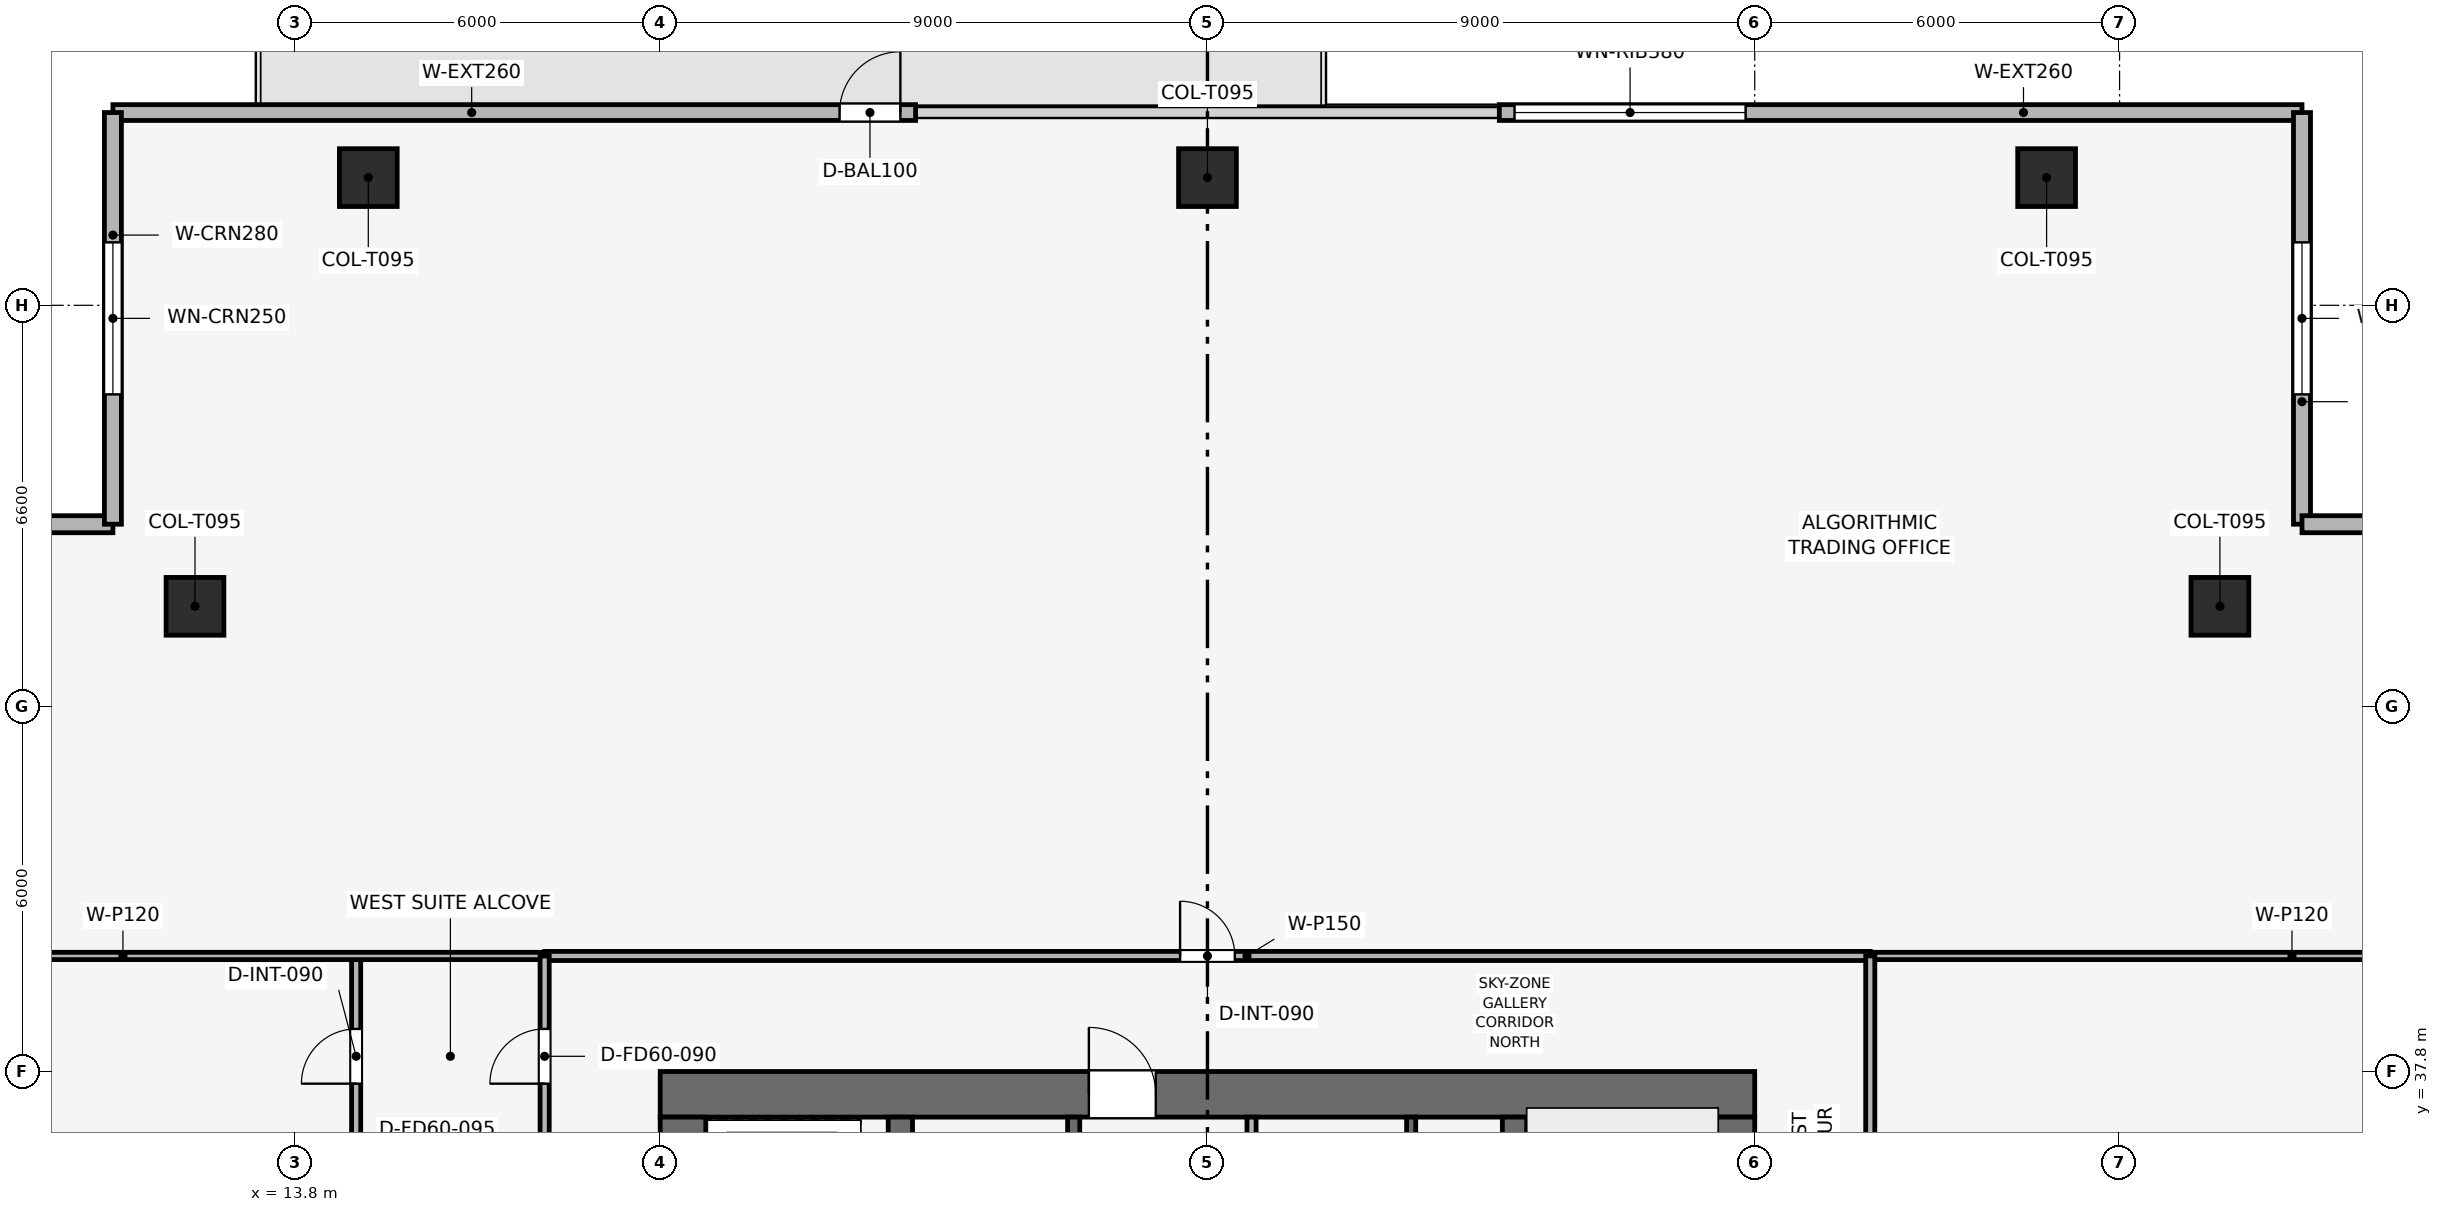
"""IFC4 building model, lengths in metres.
Left out: names, types, materials, properties, quantities, classifications, styles, units other than length and angle.
Written with IfcOpenShell. Run it as: python <this file> out.ifc"""

import sys

from ifc_helpers import new_model, si_unit, direction, frame, frame_2d, origin, origin_2d, place, context, subcontext, project, spatial, rectangle, extrude, element, fill, save


model = new_model("IFC4")
c1 = context("Model", 3, precision=1e-05, world=origin(), true_north=direction((0.0, 1.0)))
c2 = subcontext(c1, "Body", "Model", "MODEL_VIEW")
j1 = project(units=[si_unit("LENGTHUNIT", "METRE"), si_unit("PLANEANGLEUNIT", "RADIAN")], contexts=[c1])
p1 = place(None, origin())
s1 = spatial("IfcSite", under=j1, at=p1, CompositionType="ELEMENT")
p2 = place(p1, origin())
s2 = spatial("IfcBuilding", under=s1, at=p2, CompositionType="ELEMENT")
p3 = place(p2, frame((0.0, 0.0, 261.6)))
s3 = spatial("IfcBuildingStorey", under=s2, at=p3, CompositionType="ELEMENT", Elevation=261.6)
p4 = place(p3, frame((19.8, 37.425, 0.0), z_axis=(0.0, 0.0, 1.0), x_axis=(1.0, 0.0, 0.0)))
e1 = element("IfcWall", 1, at=p4, inside=s3, PredefinedType="SHEAR", context=c2, shape_type="SweptSolid", body=[
    extrude(rectangle(XDim=18.0, YDim=0.75, at=frame_2d((9.0, 0.0))), origin(), (0.0, 0.0, 1.0), 3.75),
])
p5 = place(p4, frame((7.05, 0.0, 0.0)))
e2 = element("IfcOpeningElement", 2, at=p5, cuts=e1, PredefinedType="OPENING", context=c2, shape_type="SweptSolid", body=[
    extrude(rectangle(XDim=1.1, YDim=2.15, at=frame_2d((0.55, 1.075))), frame((0.0, 0.385, 0.0), z_axis=(0.0, -1.0, 0.0), x_axis=(1.0, 0.0, 0.0)), (0.0, 0.0, 1.0), 0.77),
])
p6 = place(p3, frame((20.175, 20.55, 0.0), z_axis=(0.0, 0.0, 1.0), x_axis=(0.0, 1.0, 0.0)))
e3 = element("IfcWall", 3, at=p6, inside=s3, PredefinedType="SHEAR", context=c2, shape_type="SweptSolid", body=[
    extrude(rectangle(XDim=16.5, YDim=0.75, at=frame_2d((8.25, 0.0))), origin(), (0.0, 0.0, 1.0), 3.75),
])
p7 = place(p6, frame((10.25, 0.0, 0.0)))
e4 = element("IfcOpeningElement", 4, at=p7, cuts=e3, PredefinedType="OPENING", context=c2, shape_type="SweptSolid", body=[
    extrude(rectangle(XDim=1.1, YDim=2.15, at=frame_2d((0.55, 1.075))), frame((0.0, 0.385, 0.0), z_axis=(0.0, -1.0, 0.0), x_axis=(1.0, 0.0, 0.0)), (0.0, 0.0, 1.0), 0.77),
])
p8 = place(p3, frame((37.425, 20.55, 0.0), z_axis=(0.0, 0.0, 1.0), x_axis=(0.0, 1.0, 0.0)))
e5 = element("IfcWall", 5, at=p8, inside=s3, PredefinedType="SHEAR", context=c2, shape_type="SweptSolid", body=[
    extrude(rectangle(XDim=16.5, YDim=0.75, at=frame_2d((8.25, 0.0))), origin(), (0.0, 0.0, 1.0), 3.75),
])
p9 = place(p8, frame((4.75, 0.0, 0.0)))
e6 = element("IfcOpeningElement", 6, at=p9, cuts=e5, PredefinedType="OPENING", context=c2, shape_type="SweptSolid", body=[
    extrude(rectangle(XDim=1.1, YDim=2.15, at=frame_2d((0.55, 1.075))), frame((0.0, 0.385, 0.0), z_axis=(0.0, -1.0, 0.0), x_axis=(1.0, 0.0, 0.0)), (0.0, 0.0, 1.0), 0.77),
])
for number, where, z_axis, x_axis in (
    (7, (23.75, 20.55, 0.0), (0.0, 0.0, 1.0), (0.0, 1.0, 0.0)),
    (8, (33.85, 20.55, 0.0), (0.0, 0.0, 1.0), (0.0, 1.0, 0.0)),
):
    element("IfcWall", number, at=place(p3, frame(where, z_axis=z_axis, x_axis=x_axis)), inside=s3, PredefinedType="SHEAR", context=c2, shape_type="SweptSolid", body=[
        extrude(rectangle(XDim=16.5, YDim=0.4, at=frame_2d((8.25, 0.0))), origin(), (0.0, 0.0, 1.0), 3.75),
    ])
for number, where, z_axis, x_axis in (
    (9, (42.6, 52.5, 0.003), (0.0, 0.0, 1.0), (1.0, 0.0, 0.0)),
    (10, (28.8, 52.5, 0.003), (0.0, 0.0, 1.0), (1.0, 0.0, 0.0)),
    (11, (15.0, 52.5, 0.003), (0.0, 0.0, 1.0), (1.0, 0.0, 0.0)),
    (12, (45.45, 45.45, 0.003), (0.0, 0.0, 1.0), (1.0, 0.0, 0.0)),
    (13, (12.15, 45.45, 0.003), (0.0, 0.0, 1.0), (1.0, 0.0, 0.0)),
):
    element("IfcColumn", number, at=place(p3, frame(where, z_axis=z_axis, x_axis=x_axis)), inside=s3, PredefinedType="COLUMN", context=c2, shape_type="SweptSolid", body=[
        extrude(rectangle(XDim=0.95, YDim=0.95, at=origin_2d()), origin(), (0.0, 0.0, 1.0), 3.494),
    ])
p10 = place(p3, frame((10.8, 53.57, 0.0), z_axis=(0.0, 0.0, 1.0), x_axis=(1.0, 0.0, 0.0)))
e14 = element("IfcWall", 14, at=p10, inside=s3, PredefinedType="SOLIDWALL", context=c2, shape_type="SweptSolid", body=[
    extrude(rectangle(XDim=13.2, YDim=0.26, at=frame_2d((6.6, 0.0))), origin(), (0.0, 0.0, 1.0), 3.5),
])
p11 = place(p10, frame((11.95, 0.0, 0.0)))
e15 = element("IfcOpeningElement", 15, at=p11, cuts=e14, PredefinedType="OPENING", context=c2, shape_type="SweptSolid", body=[
    extrude(rectangle(XDim=1.0, YDim=2.2, at=frame_2d((0.5, 1.1))), frame((0.0, 0.14, 0.0), z_axis=(0.0, -1.0, 0.0), x_axis=(1.0, 0.0, 0.0)), (0.0, 0.0, 1.0), 0.28),
])
p12 = place(p3, frame((33.6, 53.57, 0.0), z_axis=(0.0, 0.0, 1.0), x_axis=(1.0, 0.0, 0.0)))
e16 = element("IfcWall", 16, at=p12, inside=s3, PredefinedType="SOLIDWALL", context=c2, shape_type="SweptSolid", body=[
    extrude(rectangle(XDim=13.2, YDim=0.26, at=frame_2d((6.6, 0.0))), origin(), (0.0, 0.0, 1.0), 3.5),
])
p13 = place(p12, frame((0.25, 0.0, 0.9)))
e17 = element("IfcOpeningElement", 17, at=p13, cuts=e16, PredefinedType="OPENING", context=c2, shape_type="SweptSolid", body=[
    extrude(rectangle(XDim=3.8, YDim=1.9, at=frame_2d((1.9, 0.95))), frame((0.0, 0.14, 0.0), z_axis=(0.0, -1.0, 0.0), x_axis=(1.0, 0.0, 0.0)), (0.0, 0.0, 1.0), 0.28),
])
p14 = place(p3, frame((4.03, 46.8, 0.0), z_axis=(0.0, 0.0, 1.0), x_axis=(1.0, 0.0, 0.0)))
e18 = element("IfcWall", 18, at=p14, inside=s3, PredefinedType="SOLIDWALL", context=c2, shape_type="SweptSolid", body=[
    extrude(rectangle(XDim=6.77, YDim=0.28, at=frame_2d((3.385, 0.0))), origin(), (0.0, 0.0, 1.0), 3.5),
])
p15 = place(p14, frame((2.135, 0.0, 0.9)))
e19 = element("IfcOpeningElement", 19, at=p15, cuts=e18, PredefinedType="OPENING", context=c2, shape_type="SweptSolid", body=[
    extrude(rectangle(XDim=2.5, YDim=1.9, at=frame_2d((1.25, 0.95))), frame((0.0, 0.15, 0.0), z_axis=(0.0, -1.0, 0.0), x_axis=(1.0, 0.0, 0.0)), (0.0, 0.0, 1.0), 0.3),
])
p16 = place(p3, frame((10.8, 46.8, 0.0), z_axis=(0.0, 0.0, 1.0), x_axis=(0.0, 1.0, 0.0)))
e20 = element("IfcWall", 20, at=p16, inside=s3, PredefinedType="SOLIDWALL", context=c2, shape_type="SweptSolid", body=[
    extrude(rectangle(XDim=6.77, YDim=0.28, at=frame_2d((3.385, 0.0))), origin(), (0.0, 0.0, 1.0), 3.5),
])
p17 = place(p16, frame((2.135, 0.0, 0.9)))
e21 = element("IfcOpeningElement", 21, at=p17, cuts=e20, PredefinedType="OPENING", context=c2, shape_type="SweptSolid", body=[
    extrude(rectangle(XDim=2.5, YDim=1.9, at=frame_2d((1.25, 0.95))), frame((0.0, 0.15, 0.0), z_axis=(0.0, -1.0, 0.0), x_axis=(1.0, 0.0, 0.0)), (0.0, 0.0, 1.0), 0.3),
])
p18 = place(p3, frame((46.8, 53.57, 0.0), z_axis=(0.0, 0.0, 1.0), x_axis=(0.0, -1.0, 0.0)))
e22 = element("IfcWall", 22, at=p18, inside=s3, PredefinedType="SOLIDWALL", context=c2, shape_type="SweptSolid", body=[
    extrude(rectangle(XDim=6.77, YDim=0.28, at=frame_2d((3.385, 0.0))), origin(), (0.0, 0.0, 1.0), 3.5),
])
p19 = place(p18, frame((2.135, 0.0, 0.9)))
e23 = element("IfcOpeningElement", 23, at=p19, cuts=e22, PredefinedType="OPENING", context=c2, shape_type="SweptSolid", body=[
    extrude(rectangle(XDim=2.5, YDim=1.9, at=frame_2d((1.25, 0.95))), frame((0.0, 0.15, 0.0), z_axis=(0.0, -1.0, 0.0), x_axis=(1.0, 0.0, 0.0)), (0.0, 0.0, 1.0), 0.3),
])
p20 = place(p3, frame((46.8, 46.8, 0.0), z_axis=(0.0, 0.0, 1.0), x_axis=(1.0, 0.0, 0.0)))
e24 = element("IfcWall", 24, at=p20, inside=s3, PredefinedType="SOLIDWALL", context=c2, shape_type="SweptSolid", body=[
    extrude(rectangle(XDim=6.77, YDim=0.28, at=frame_2d((3.385, 0.0))), origin(), (0.0, 0.0, 1.0), 3.5),
])
p21 = place(p20, frame((2.135, 0.0, 0.9)))
e25 = element("IfcOpeningElement", 25, at=p21, cuts=e24, PredefinedType="OPENING", context=c2, shape_type="SweptSolid", body=[
    extrude(rectangle(XDim=2.5, YDim=1.9, at=frame_2d((1.25, 0.95))), frame((0.0, 0.15, 0.0), z_axis=(0.0, -1.0, 0.0), x_axis=(1.0, 0.0, 0.0)), (0.0, 0.0, 1.0), 0.3),
])
p22 = place(p3, frame((32.15, 34.0, 0.0), z_axis=(0.0, 0.0, 1.0), x_axis=(0.0, 1.0, 0.0)))
e26 = element("IfcWall", 26, at=p22, inside=s3, PredefinedType="SHEAR", context=c2, shape_type="SweptSolid", body=[
    extrude(rectangle(XDim=3.05, YDim=0.15, at=frame_2d((1.525, 0.0))), origin(), (0.0, 0.0, 1.0), 3.5),
])
p23 = place(p3, frame((26.6, 34.0, 0.0), z_axis=(0.0, 0.0, 1.0), x_axis=(0.0, 1.0, 0.0)))
e27 = element("IfcWall", 27, at=p23, inside=s3, PredefinedType="SHEAR", context=c2, shape_type="SweptSolid", body=[
    extrude(rectangle(XDim=3.05, YDim=0.2, at=frame_2d((1.525, 0.0))), origin(), (0.0, 0.0, 1.0), 3.5),
])
p24 = place(p23, frame((0.75, 0.0, 0.0)))
e28 = element("IfcOpeningElement", 28, at=p24, cuts=e27, PredefinedType="OPENING", context=c2, shape_type="SweptSolid", body=[
    extrude(rectangle(XDim=1.1, YDim=2.15, at=frame_2d((0.55, 1.075))), frame((0.0, 0.11, 0.0), z_axis=(0.0, -1.0, 0.0), x_axis=(1.0, 0.0, 0.0)), (0.0, 0.0, 1.0), 0.22),
])
p25 = place(p3, frame((29.525, 33.925, 0.0), z_axis=(0.0, 0.0, 1.0), x_axis=(0.0, 1.0, 0.0)))
e29 = element("IfcWall", 29, at=p25, inside=s3, PredefinedType="PARTITIONING", context=c2, shape_type="SweptSolid", body=[
    extrude(rectangle(XDim=3.125, YDim=0.15, at=frame_2d((1.562, 0.0))), origin(), (0.0, 0.0, 1.0), 3.5),
])
p26 = place(p25, frame((0.85, 0.0, 0.0)))
e30 = element("IfcOpeningElement", 30, at=p26, cuts=e29, PredefinedType="OPENING", context=c2, shape_type="SweptSolid", body=[
    extrude(rectangle(XDim=0.9, YDim=2.1, at=frame_2d((0.45, 1.05))), frame((0.0, 0.085, 0.0), z_axis=(0.0, -1.0, 0.0), x_axis=(1.0, 0.0, 0.0)), (0.0, 0.0, 1.0), 0.17),
])
p27 = place(p3, frame((14.8, 28.0, 0.0), z_axis=(0.0, 0.0, 1.0), x_axis=(0.0, 1.0, 0.0)))
e31 = element("IfcWall", 31, at=p27, inside=s3, PredefinedType="PARTITIONING", context=c2, shape_type="SweptSolid", body=[
    extrude(rectangle(XDim=11.7, YDim=0.15, at=frame_2d((5.85, 0.0))), origin(), (0.0, 0.0, 1.0), 3.085),
])
p28 = place(p27, frame((9.6, 0.0, 0.0)))
e32 = element("IfcOpeningElement", 32, at=p28, cuts=e31, PredefinedType="OPENING", context=c2, shape_type="SweptSolid", body=[
    extrude(rectangle(XDim=0.9, YDim=2.1, at=frame_2d((0.45, 1.05))), frame((0.0, 0.085, 0.0), z_axis=(0.0, -1.0, 0.0), x_axis=(1.0, 0.0, 0.0)), (0.0, 0.0, 1.0), 0.17),
])
p29 = place(p3, frame((4.03, 39.7, 0.0), z_axis=(0.0, 0.0, 1.0), x_axis=(1.0, 0.0, 0.0)))
e33 = element("IfcWall", 33, at=p29, inside=s3, PredefinedType="PARTITIONING", context=c2, shape_type="SweptSolid", body=[
    extrude(rectangle(XDim=13.87, YDim=0.12, at=frame_2d((6.935, 0.0))), origin(), (0.0, 0.0, 1.0), 3.085),
])
p30 = place(p3, frame((39.7, 39.7, 0.0), z_axis=(0.0, 0.0, 1.0), x_axis=(1.0, 0.0, 0.0)))
e34 = element("IfcWall", 34, at=p30, inside=s3, PredefinedType="PARTITIONING", context=c2, shape_type="SweptSolid", body=[
    extrude(rectangle(XDim=13.87, YDim=0.12, at=frame_2d((6.935, 0.0))), origin(), (0.0, 0.0, 1.0), 3.085),
])
p31 = place(p3, frame((17.9, 39.7, 0.0), z_axis=(0.0, 0.0, 1.0), x_axis=(1.0, 0.0, 0.0)))
e35 = element("IfcWall", 35, at=p31, inside=s3, PredefinedType="PARTITIONING", context=c2, shape_type="SweptSolid", body=[
    extrude(rectangle(XDim=21.8, YDim=0.15, at=frame_2d((10.9, 0.0))), origin(), (0.0, 0.0, 1.0), 3.085),
])
p32 = place(p31, frame((10.45, 0.0, 0.0)))
e36 = element("IfcOpeningElement", 36, at=p32, cuts=e35, PredefinedType="OPENING", context=c2, shape_type="SweptSolid", body=[
    extrude(rectangle(XDim=0.9, YDim=2.1, at=frame_2d((0.45, 1.05))), frame((0.0, 0.085, 0.0), z_axis=(0.0, -1.0, 0.0), x_axis=(1.0, 0.0, 0.0)), (0.0, 0.0, 1.0), 0.17),
])
p33 = place(p3, frame((17.9, 10.8, 0.0), z_axis=(0.0, 0.0, 1.0), x_axis=(0.0, 1.0, 0.0)))
e37 = element("IfcWall", 37, at=p33, inside=s3, PredefinedType="PARTITIONING", context=c2, shape_type="SweptSolid", body=[
    extrude(rectangle(XDim=28.9, YDim=0.15, at=frame_2d((14.45, 0.0))), origin(), (0.0, 0.0, 1.0), 3.085),
])
p34 = place(p33, frame((8.15, 0.0, 0.0)))
e38 = element("IfcOpeningElement", 38, at=p34, cuts=e37, PredefinedType="OPENING", context=c2, shape_type="SweptSolid", body=[
    extrude(rectangle(XDim=0.9, YDim=2.1, at=frame_2d((0.45, 1.05))), frame((0.0, 0.085, 0.0), z_axis=(0.0, -1.0, 0.0), x_axis=(1.0, 0.0, 0.0)), (0.0, 0.0, 1.0), 0.17),
])
p35 = place(p33, frame((18.15, 0.0, 0.0)))
e39 = element("IfcOpeningElement", 39, at=p35, cuts=e37, PredefinedType="OPENING", context=c2, shape_type="SweptSolid", body=[
    extrude(rectangle(XDim=0.9, YDim=2.1, at=frame_2d((0.45, 1.05))), frame((0.0, 0.085, 0.0), z_axis=(0.0, -1.0, 0.0), x_axis=(1.0, 0.0, 0.0)), (0.0, 0.0, 1.0), 0.17),
])
p36 = place(p33, frame((21.05, 0.0, 0.0)))
e40 = element("IfcOpeningElement", 40, at=p36, cuts=e37, PredefinedType="OPENING", context=c2, shape_type="SweptSolid", body=[
    extrude(rectangle(XDim=0.9, YDim=2.1, at=frame_2d((0.45, 1.05))), frame((0.0, 0.085, 0.0), z_axis=(0.0, -1.0, 0.0), x_axis=(1.0, 0.0, 0.0)), (0.0, 0.0, 1.0), 0.17),
])
p37 = place(p33, frame((23.8, 0.0, 0.0)))
e41 = element("IfcOpeningElement", 41, at=p37, cuts=e37, PredefinedType="OPENING", context=c2, shape_type="SweptSolid", body=[
    extrude(rectangle(XDim=0.95, YDim=2.1, at=frame_2d((0.475, 1.05))), frame((0.0, 0.085, 0.0), z_axis=(0.0, -1.0, 0.0), x_axis=(1.0, 0.0, 0.0)), (0.0, 0.0, 1.0), 0.17),
])
p38 = place(p33, frame((26.8, 0.0, 0.0)))
e42 = element("IfcOpeningElement", 42, at=p38, cuts=e37, PredefinedType="OPENING", context=c2, shape_type="SweptSolid", body=[
    extrude(rectangle(XDim=0.9, YDim=2.1, at=frame_2d((0.45, 1.05))), frame((0.0, 0.085, 0.0), z_axis=(0.0, -1.0, 0.0), x_axis=(1.0, 0.0, 0.0)), (0.0, 0.0, 1.0), 0.17),
])
p39 = place(p3, frame((39.7, 24.4, 0.0), z_axis=(0.0, 0.0, 1.0), x_axis=(0.0, 1.0, 0.0)))
e43 = element("IfcWall", 43, at=p39, inside=s3, PredefinedType="PARTITIONING", context=c2, shape_type="SweptSolid", body=[
    extrude(rectangle(XDim=15.3, YDim=0.15, at=frame_2d((7.65, 0.0))), origin(), (0.0, 0.0, 1.0), 3.085),
])
p40 = place(p39, frame((7.2, 0.0, 0.0)))
e44 = element("IfcOpeningElement", 44, at=p40, cuts=e43, PredefinedType="OPENING", context=c2, shape_type="SweptSolid", body=[
    extrude(rectangle(XDim=0.9, YDim=2.1, at=frame_2d((0.45, 1.05))), frame((0.0, 0.085, 0.0), z_axis=(0.0, -1.0, 0.0), x_axis=(1.0, 0.0, 0.0)), (0.0, 0.0, 1.0), 0.17),
])
p41 = place(p11, origin())
e45 = element("IfcDoor", 45, at=p41, inside=s3, OperationType="SINGLE_SWING_RIGHT", PredefinedType="DOOR", context=c2, shape_type="SweptSolid", body=[
    extrude(rectangle(XDim=1.0, YDim=2.2, at=frame_2d((0.5, 1.1))), frame((0.0, 0.025, 0.0), z_axis=(0.0, -1.0, 0.0), x_axis=(1.0, 0.0, 0.0)), (0.0, 0.0, 1.0), 0.05),
])
fill(e15, e45)
p42 = place(p13, origin())
e46 = element("IfcWindow", 46, at=p42, inside=s3, PartitioningType="SINGLE_PANEL", PredefinedType="WINDOW", context=c2, shape_type="SweptSolid", body=[
    extrude(rectangle(XDim=3.8, YDim=1.9, at=frame_2d((1.9, 0.95))), frame((0.0, 0.03, 0.0), z_axis=(0.0, -1.0, 0.0), x_axis=(1.0, 0.0, 0.0)), (0.0, 0.0, 1.0), 0.06),
])
fill(e17, e46)
p43 = place(p17, origin())
e47 = element("IfcWindow", 47, at=p43, inside=s3, PartitioningType="SINGLE_PANEL", PredefinedType="WINDOW", context=c2, shape_type="SweptSolid", body=[
    extrude(rectangle(XDim=2.5, YDim=1.9, at=frame_2d((1.25, 0.95))), frame((0.0, 0.03, 0.0), z_axis=(0.0, -1.0, 0.0), x_axis=(1.0, 0.0, 0.0)), (0.0, 0.0, 1.0), 0.06),
])
fill(e21, e47)
p44 = place(p19, origin())
e48 = element("IfcWindow", 48, at=p44, inside=s3, PartitioningType="SINGLE_PANEL", PredefinedType="WINDOW", context=c2, shape_type="SweptSolid", body=[
    extrude(rectangle(XDim=2.5, YDim=1.9, at=frame_2d((1.25, 0.95))), frame((0.0, 0.03, 0.0), z_axis=(0.0, -1.0, 0.0), x_axis=(1.0, 0.0, 0.0)), (0.0, 0.0, 1.0), 0.06),
])
fill(e23, e48)
p45 = place(p28, origin())
e49 = element("IfcDoor", 49, at=p45, inside=s3, OperationType="SINGLE_SWING_LEFT", PredefinedType="DOOR", context=c2, shape_type="SweptSolid", body=[
    extrude(rectangle(XDim=0.9, YDim=2.1, at=frame_2d((0.45, 1.05))), frame((0.0, 0.025, 0.0), z_axis=(0.0, -1.0, 0.0), x_axis=(1.0, 0.0, 0.0)), (0.0, 0.0, 1.0), 0.05),
])
fill(e32, e49)
p46 = place(p32, origin())
e50 = element("IfcDoor", 50, at=p46, inside=s3, OperationType="SINGLE_SWING_LEFT", PredefinedType="DOOR", context=c2, shape_type="SweptSolid", body=[
    extrude(rectangle(XDim=0.9, YDim=2.1, at=frame_2d((0.45, 1.05))), frame((0.0, 0.025, 0.0), z_axis=(0.0, -1.0, 0.0), x_axis=(1.0, 0.0, 0.0)), (0.0, 0.0, 1.0), 0.05),
])
fill(e36, e50)
p47 = place(p38, origin())
e51 = element("IfcDoor", 51, at=p47, inside=s3, OperationType="SINGLE_SWING_LEFT", PredefinedType="DOOR", context=c2, shape_type="SweptSolid", body=[
    extrude(rectangle(XDim=0.9, YDim=2.1, at=frame_2d((0.45, 1.05))), frame((0.0, 0.025, 0.0), z_axis=(0.0, -1.0, 0.0), x_axis=(1.0, 0.0, 0.0)), (0.0, 0.0, 1.0), 0.05),
])
fill(e42, e51)
p48 = place(p5, origin())
e52 = element("IfcDoor", 52, at=p48, inside=s3, OperationType="SINGLE_SWING_LEFT", PredefinedType="DOOR", context=c2, shape_type="SweptSolid", body=[
    extrude(rectangle(XDim=1.1, YDim=2.15, at=frame_2d((0.55, 1.075))), frame((0.0, 0.025, 0.0), z_axis=(0.0, -1.0, 0.0), x_axis=(1.0, 0.0, 0.0)), (0.0, 0.0, 1.0), 0.05),
])
fill(e2, e52)
save(model, sys.argv[1])
